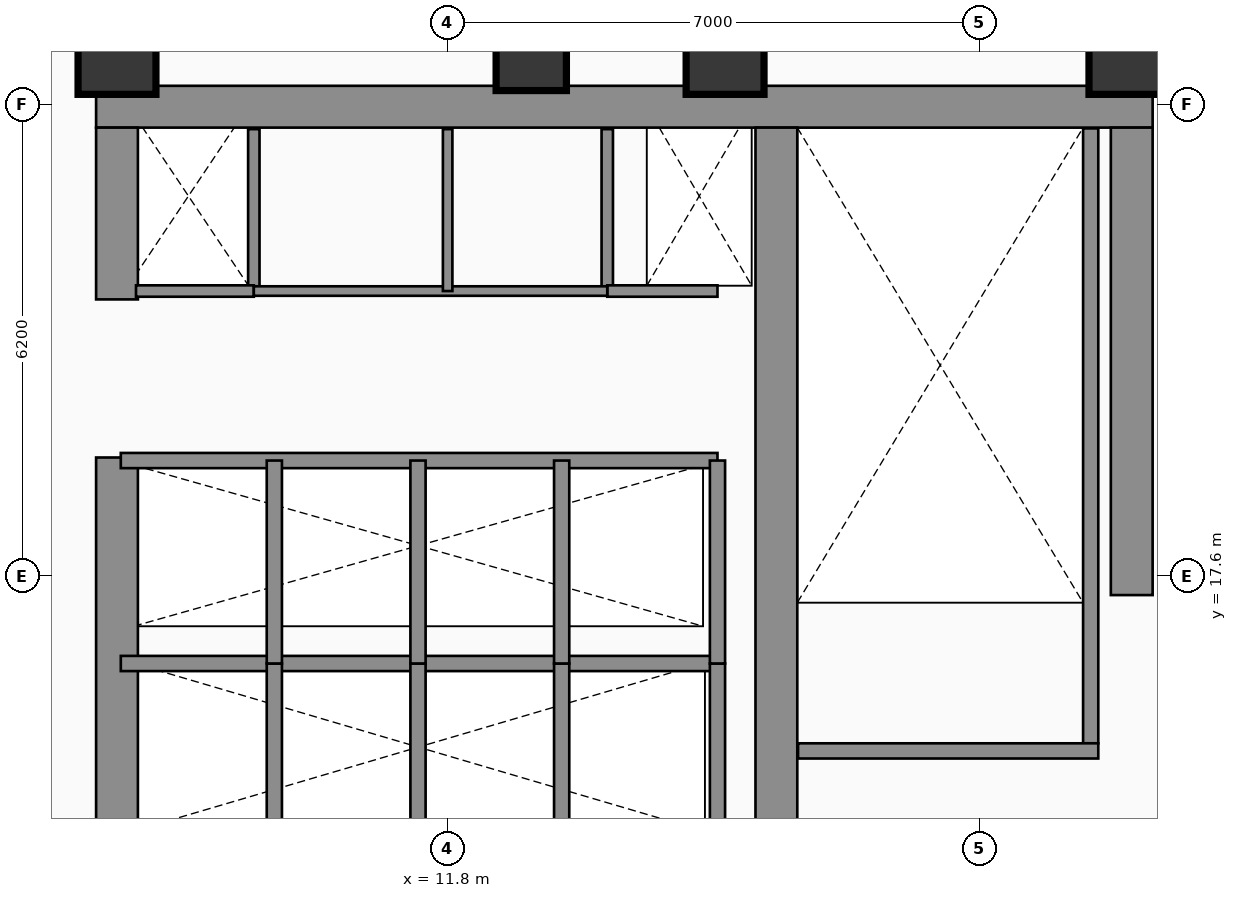
"""IFC4 building model, lengths in metres.
Left out: names, types, materials, properties, quantities, classifications, styles, units other than length and angle.
Written with IfcOpenShell. Run it as: python <this file> out.ifc"""

import sys

from ifc_helpers import new_model, si_unit, direction, frame, frame_2d, origin, origin_2d, place, context, subcontext, project, spatial, rectangle, extrude, element, fill, save


model = new_model("IFC4")
c1 = context("Model", 3, precision=1e-05, world=origin(), true_north=direction((0.0, 1.0)))
c2 = subcontext(c1, "Body", "Model", "MODEL_VIEW")
j1 = project(units=[si_unit("LENGTHUNIT", "METRE"), si_unit("PLANEANGLEUNIT", "RADIAN")], contexts=[c1])
p1 = place(None, origin())
s1 = spatial("IfcSite", under=j1, at=p1, CompositionType="ELEMENT")
p2 = place(p1, origin())
s2 = spatial("IfcBuilding", under=s1, at=p2, CompositionType="ELEMENT")
p3 = place(p2, frame((0.0, 0.0, 223.5)))
s3 = spatial("IfcBuildingStorey", under=s2, at=p3, CompositionType="ELEMENT", Elevation=223.5)
p4 = place(p3, frame((7.175, 23.775, 0.0), z_axis=(0.0, 0.0, 1.0), x_axis=(1.0, 0.0, 0.0)))
e1 = element("IfcWall", 1, at=p4, inside=s3, PredefinedType="SHEAR", context=c2, shape_type="SweptSolid", body=[
    extrude(rectangle(XDim=13.9, YDim=0.55, at=frame_2d((6.95, 0.0))), origin(), (0.0, 0.0, 1.0), 3.56),
])
p5 = place(p3, frame((7.45, 14.35, 0.0), z_axis=(0.0, 0.0, 1.0), x_axis=(0.0, 1.0, 0.0)))
e2 = element("IfcWall", 2, at=p5, inside=s3, PredefinedType="SHEAR", context=c2, shape_type="SweptSolid", body=[
    extrude(rectangle(XDim=4.81, YDim=0.55, at=frame_2d((2.405, 0.0))), origin(), (0.0, 0.0, 1.0), 3.56),
])
p6 = place(p3, frame((7.45, 21.24, 0.0), z_axis=(0.0, 0.0, 1.0), x_axis=(0.0, 1.0, 0.0)))
e3 = element("IfcWall", 3, at=p6, inside=s3, PredefinedType="SHEAR", context=c2, shape_type="SweptSolid", body=[
    extrude(rectangle(XDim=2.26, YDim=0.55, at=frame_2d((1.13, 0.0))), origin(), (0.0, 0.0, 1.0), 3.56),
])
p7 = place(p3, frame((20.8, 17.35, 0.0), z_axis=(0.0, 0.0, 1.0), x_axis=(0.0, 1.0, 0.0)))
e4 = element("IfcWall", 4, at=p7, inside=s3, PredefinedType="SHEAR", context=c2, shape_type="SweptSolid", body=[
    extrude(rectangle(XDim=6.15, YDim=0.55, at=frame_2d((3.075, 0.0))), origin(), (0.0, 0.0, 1.0), 3.56),
])
p8 = place(p3, frame((16.125, 14.4, 0.0), z_axis=(0.0, 0.0, 1.0), x_axis=(0.0, 1.0, 0.0)))
e5 = element("IfcWall", 5, at=p8, inside=s3, PredefinedType="SHEAR", context=c2, shape_type="SweptSolid", body=[
    extrude(rectangle(XDim=9.1, YDim=0.55, at=frame_2d((4.55, 0.0))), origin(), (0.0, 0.0, 1.0), 3.56),
])
for number, where, z_axis, x_axis in (
    (6, (7.45, 24.45, 0.0), (0.0, 0.0, 1.0), (1.0, 0.0, 0.0)),
    (7, (15.45, 24.45, 0.0), (0.0, 0.0, 1.0), (1.0, 0.0, 0.0)),
    (8, (20.75, 24.45, 0.0), (0.0, 0.0, 1.0), (1.0, 0.0, 0.0)),
):
    element("IfcColumn", number, at=place(p3, frame(where, z_axis=z_axis, x_axis=x_axis)), inside=s3, PredefinedType="COLUMN", context=c2, shape_type="SweptSolid", body=[
        extrude(rectangle(XDim=1.0, YDim=1.0, at=origin_2d()), origin(), (0.0, 0.0, 1.0), 3.56),
    ])
p9 = place(p3, frame((12.9, 24.45, 0.0), z_axis=(0.0, 0.0, 1.0), x_axis=(1.0, 0.0, 0.0)))
e9 = element("IfcColumn", 9, at=p9, inside=s3, PredefinedType="COLUMN", context=c2, shape_type="SweptSolid", body=[
    extrude(rectangle(XDim=0.9, YDim=0.9, at=origin_2d()), origin(), (0.0, 0.0, 1.0), 3.56),
])
p10 = place(p3, frame((27.685, 19.775, 0.0), z_axis=(0.0, 0.0, 1.0), x_axis=(-0.707106781187, 0.707106781187, 0.0)))
e10 = element("IfcWall", 10, at=p10, inside=s3, PredefinedType="SOLIDWALL", context=c2, shape_type="SweptSolid", body=[
    extrude(rectangle(XDim=9.207, YDim=0.28, at=frame_2d((4.603, 0.0))), origin(), (0.0, 0.0, 1.0), 3.56),
])
p11 = place(p3, frame((20.26, 15.4, 0.0), z_axis=(0.0, 0.0, 1.0), x_axis=(0.0, 1.0, 0.0)))
e11 = element("IfcWall", 11, at=p11, inside=s3, PredefinedType="SHEAR", context=c2, shape_type="SweptSolid", body=[
    extrude(rectangle(XDim=8.09, YDim=0.2, at=frame_2d((4.045, 0.0))), origin(), (0.0, 0.0, 1.0), 3.56),
])
p12 = place(p3, frame((16.41, 15.3, 0.0), z_axis=(0.0, 0.0, 1.0), x_axis=(1.0, 0.0, 0.0)))
e12 = element("IfcWall", 12, at=p12, inside=s3, PredefinedType="PARTITIONING", context=c2, shape_type="SweptSolid", body=[
    extrude(rectangle(XDim=3.95, YDim=0.2, at=frame_2d((1.975, 0.0))), origin(), (0.0, 0.0, 1.0), 3.56),
])
p13 = place(p12, frame((1.294, 0.0, 0.0)))
e13 = element("IfcOpeningElement", 13, at=p13, cuts=e12, PredefinedType="OPENING", context=c2, shape_type="SweptSolid", body=[
    extrude(rectangle(XDim=1.1, YDim=2.2, at=frame_2d((0.55, 1.1))), frame((0.0, 0.11, 0.0), z_axis=(0.0, -1.0, 0.0), x_axis=(1.0, 0.0, 0.0)), (0.0, 0.0, 1.0), 0.22),
])
p14 = place(p3, frame((7.5, 16.45, 0.0), z_axis=(0.0, 0.0, 1.0), x_axis=(1.0, 0.0, 0.0)))
e14 = element("IfcWall", 14, at=p14, inside=s3, PredefinedType="PARTITIONING", context=c2, shape_type="SweptSolid", body=[
    extrude(rectangle(XDim=7.85, YDim=0.2, at=frame_2d((3.925, 0.0))), origin(), (0.0, 0.0, 1.0), 3.56),
])
for number, where, z_axis, x_axis in (
    (15, (15.35, 14.22, 0.0), (0.0, 0.0, 1.0), (0.0, 1.0, 0.0)),
    (16, (9.52, 14.22, 0.0), (0.0, 0.0, 1.0), (0.0, 1.0, 0.0)),
    (17, (11.41, 14.22, 0.0), (0.0, 0.0, 1.0), (0.0, 1.0, 0.0)),
    (18, (13.3, 14.22, 0.0), (0.0, 0.0, 1.0), (0.0, 1.0, 0.0)),
):
    element("IfcWall", number, at=place(p3, frame(where, z_axis=z_axis, x_axis=x_axis)), inside=s3, PredefinedType="PARTITIONING", context=c2, shape_type="SweptSolid", body=[
        extrude(rectangle(XDim=2.23, YDim=0.2, at=frame_2d((1.115, 0.0))), origin(), (0.0, 0.0, 1.0), 3.56),
    ])
p15 = place(p3, frame((7.5, 19.12, 0.0), z_axis=(0.0, 0.0, 1.0), x_axis=(1.0, 0.0, 0.0)))
e19 = element("IfcWall", 19, at=p15, inside=s3, PredefinedType="PARTITIONING", context=c2, shape_type="SweptSolid", body=[
    extrude(rectangle(XDim=7.85, YDim=0.2, at=frame_2d((3.925, 0.0))), origin(), (0.0, 0.0, 1.0), 3.56),
])
p16 = place(p15, frame((0.53, 0.0, 0.0)))
e20 = element("IfcOpeningElement", 20, at=p16, cuts=e19, PredefinedType="OPENING", context=c2, shape_type="SweptSolid", body=[
    extrude(rectangle(XDim=1.1, YDim=2.2, at=frame_2d((0.55, 1.1))), frame((0.0, 0.11, 0.0), z_axis=(0.0, -1.0, 0.0), x_axis=(1.0, 0.0, 0.0)), (0.0, 0.0, 1.0), 0.22),
])
p17 = place(p15, frame((2.42, 0.0, 0.0)))
e21 = element("IfcOpeningElement", 21, at=p17, cuts=e19, PredefinedType="OPENING", context=c2, shape_type="SweptSolid", body=[
    extrude(rectangle(XDim=1.1, YDim=2.2, at=frame_2d((0.55, 1.1))), frame((0.0, 0.11, 0.0), z_axis=(0.0, -1.0, 0.0), x_axis=(1.0, 0.0, 0.0)), (0.0, 0.0, 1.0), 0.22),
])
p18 = place(p15, frame((4.31, 0.0, 0.0)))
e22 = element("IfcOpeningElement", 22, at=p18, cuts=e19, PredefinedType="OPENING", context=c2, shape_type="SweptSolid", body=[
    extrude(rectangle(XDim=1.1, YDim=2.2, at=frame_2d((0.55, 1.1))), frame((0.0, 0.11, 0.0), z_axis=(0.0, -1.0, 0.0), x_axis=(1.0, 0.0, 0.0)), (0.0, 0.0, 1.0), 0.22),
])
p19 = place(p15, frame((6.2, 0.0, 0.0)))
e23 = element("IfcOpeningElement", 23, at=p19, cuts=e19, PredefinedType="OPENING", context=c2, shape_type="SweptSolid", body=[
    extrude(rectangle(XDim=1.1, YDim=2.2, at=frame_2d((0.55, 1.1))), frame((0.0, 0.11, 0.0), z_axis=(0.0, -1.0, 0.0), x_axis=(1.0, 0.0, 0.0)), (0.0, 0.0, 1.0), 0.22),
])
for number, where, z_axis, x_axis in (
    (24, (15.35, 16.45, 0.0), (0.0, 0.0, 1.0), (0.0, 1.0, 0.0)),
    (25, (9.52, 16.45, 0.0), (0.0, 0.0, 1.0), (0.0, 1.0, 0.0)),
    (26, (11.41, 16.45, 0.0), (0.0, 0.0, 1.0), (0.0, 1.0, 0.0)),
    (27, (13.3, 16.45, 0.0), (0.0, 0.0, 1.0), (0.0, 1.0, 0.0)),
):
    element("IfcWall", number, at=place(p3, frame(where, z_axis=z_axis, x_axis=x_axis)), inside=s3, PredefinedType="PARTITIONING", context=c2, shape_type="SweptSolid", body=[
        extrude(rectangle(XDim=2.67, YDim=0.2, at=frame_2d((1.335, 0.0))), origin(), (0.0, 0.0, 1.0), 3.56),
    ])
for number, where, z_axis, x_axis in (
    (28, (9.25, 21.35, 0.0), (0.0, 0.0, 1.0), (0.0, 1.0, 0.0)),
    (29, (13.9, 21.35, 0.0), (0.0, 0.0, 1.0), (0.0, 1.0, 0.0)),
):
    element("IfcWall", number, at=place(p3, frame(where, z_axis=z_axis, x_axis=x_axis)), inside=s3, PredefinedType="PARTITIONING", context=c2, shape_type="SweptSolid", body=[
        extrude(rectangle(XDim=2.13, YDim=0.15, at=frame_2d((1.065, 0.0))), origin(), (0.0, 0.0, 1.0), 3.56),
    ])
p20 = place(p3, frame((7.7, 21.35, 0.0), z_axis=(0.0, 0.0, 1.0), x_axis=(1.0, 0.0, 0.0)))
e30 = element("IfcWall", 30, at=p20, inside=s3, PredefinedType="PARTITIONING", context=c2, shape_type="SweptSolid", body=[
    extrude(rectangle(XDim=1.55, YDim=0.15, at=frame_2d((0.775, 0.0))), origin(), (0.0, 0.0, 1.0), 3.56),
])
p21 = place(p20, frame((0.39, 0.0, 0.0)))
e31 = element("IfcOpeningElement", 31, at=p21, cuts=e30, PredefinedType="OPENING", context=c2, shape_type="SweptSolid", body=[
    extrude(rectangle(XDim=0.85, YDim=2.15, at=frame_2d((0.425, 1.075))), frame((0.0, 0.085, 0.0), z_axis=(0.0, -1.0, 0.0), x_axis=(1.0, 0.0, 0.0)), (0.0, 0.0, 1.0), 0.17),
])
p22 = place(p3, frame((13.9, 21.35, 0.0), z_axis=(0.0, 0.0, 1.0), x_axis=(1.0, 0.0, 0.0)))
e32 = element("IfcWall", 32, at=p22, inside=s3, PredefinedType="PARTITIONING", context=c2, shape_type="SweptSolid", body=[
    extrude(rectangle(XDim=1.45, YDim=0.15, at=frame_2d((0.725, 0.0))), origin(), (0.0, 0.0, 1.0), 3.56),
])
p23 = place(p3, frame((9.25, 21.35, 0.0), z_axis=(0.0, 0.0, 1.0), x_axis=(1.0, 0.0, 0.0)))
e33 = element("IfcWall", 33, at=p23, inside=s3, PredefinedType="PARTITIONING", context=c2, shape_type="SweptSolid", body=[
    extrude(rectangle(XDim=4.65, YDim=0.125, at=frame_2d((2.325, 0.0))), origin(), (0.0, 0.0, 1.0), 3.56),
])
p24 = place(p23, frame((0.85, 0.0, 0.0)))
e34 = element("IfcOpeningElement", 34, at=p24, cuts=e33, PredefinedType="OPENING", context=c2, shape_type="SweptSolid", body=[
    extrude(rectangle(XDim=0.85, YDim=2.15, at=frame_2d((0.425, 1.075))), frame((0.0, 0.073, 0.0), z_axis=(0.0, -1.0, 0.0), x_axis=(1.0, 0.0, 0.0)), (0.0, 0.0, 1.0), 0.145),
])
p25 = place(p23, frame((3.25, 0.0, 0.0)))
e35 = element("IfcOpeningElement", 35, at=p25, cuts=e33, PredefinedType="OPENING", context=c2, shape_type="SweptSolid", body=[
    extrude(rectangle(XDim=0.85, YDim=2.15, at=frame_2d((0.425, 1.075))), frame((0.0, 0.073, 0.0), z_axis=(0.0, -1.0, 0.0), x_axis=(1.0, 0.0, 0.0)), (0.0, 0.0, 1.0), 0.145),
])
p26 = place(p3, frame((11.8, 21.35, 0.0), z_axis=(0.0, 0.0, 1.0), x_axis=(0.0, 1.0, 0.0)))
e36 = element("IfcWall", 36, at=p26, inside=s3, PredefinedType="PARTITIONING", context=c2, shape_type="SweptSolid", body=[
    extrude(rectangle(XDim=2.13, YDim=0.125, at=frame_2d((1.065, 0.0))), origin(), (0.0, 0.0, 1.0), 3.56),
])
p27 = place(p13, origin())
e37 = element("IfcDoor", 37, at=p27, inside=s3, OperationType="SINGLE_SWING_LEFT", PredefinedType="DOOR", context=c2, shape_type="SweptSolid", body=[
    extrude(rectangle(XDim=1.1, YDim=2.2, at=frame_2d((0.55, 1.1))), frame((0.0, 0.025, 0.0), z_axis=(0.0, -1.0, 0.0), x_axis=(1.0, 0.0, 0.0)), (0.0, 0.0, 1.0), 0.05),
])
fill(e13, e37)
p28 = place(p16, origin())
e38 = element("IfcDoor", 38, at=p28, inside=s3, OperationType="SLIDING_TO_LEFT", PredefinedType="DOOR", context=c2, shape_type="SweptSolid", body=[
    extrude(rectangle(XDim=1.1, YDim=2.2, at=frame_2d((0.55, 1.1))), frame((0.0, 0.025, 0.0), z_axis=(0.0, -1.0, 0.0), x_axis=(1.0, 0.0, 0.0)), (0.0, 0.0, 1.0), 0.05),
])
fill(e20, e38)
p29 = place(p17, origin())
e39 = element("IfcDoor", 39, at=p29, inside=s3, OperationType="SLIDING_TO_LEFT", PredefinedType="DOOR", context=c2, shape_type="SweptSolid", body=[
    extrude(rectangle(XDim=1.1, YDim=2.2, at=frame_2d((0.55, 1.1))), frame((0.0, 0.025, 0.0), z_axis=(0.0, -1.0, 0.0), x_axis=(1.0, 0.0, 0.0)), (0.0, 0.0, 1.0), 0.05),
])
fill(e21, e39)
p30 = place(p18, origin())
e40 = element("IfcDoor", 40, at=p30, inside=s3, OperationType="SLIDING_TO_LEFT", PredefinedType="DOOR", context=c2, shape_type="SweptSolid", body=[
    extrude(rectangle(XDim=1.1, YDim=2.2, at=frame_2d((0.55, 1.1))), frame((0.0, 0.025, 0.0), z_axis=(0.0, -1.0, 0.0), x_axis=(1.0, 0.0, 0.0)), (0.0, 0.0, 1.0), 0.05),
])
fill(e22, e40)
p31 = place(p19, origin())
e41 = element("IfcDoor", 41, at=p31, inside=s3, OperationType="SLIDING_TO_LEFT", PredefinedType="DOOR", context=c2, shape_type="SweptSolid", body=[
    extrude(rectangle(XDim=1.1, YDim=2.2, at=frame_2d((0.55, 1.1))), frame((0.0, 0.025, 0.0), z_axis=(0.0, -1.0, 0.0), x_axis=(1.0, 0.0, 0.0)), (0.0, 0.0, 1.0), 0.05),
])
fill(e23, e41)
p32 = place(p21, origin())
e42 = element("IfcDoor", 42, at=p32, inside=s3, OperationType="SINGLE_SWING_LEFT", PredefinedType="DOOR", context=c2, shape_type="SweptSolid", body=[
    extrude(rectangle(XDim=0.85, YDim=2.15, at=frame_2d((0.425, 1.075))), frame((0.0, 0.025, 0.0), z_axis=(0.0, -1.0, 0.0), x_axis=(1.0, 0.0, 0.0)), (0.0, 0.0, 1.0), 0.05),
])
fill(e31, e42)
p33 = place(p24, origin())
e43 = element("IfcDoor", 43, at=p33, inside=s3, OperationType="SINGLE_SWING_RIGHT", PredefinedType="DOOR", context=c2, shape_type="SweptSolid", body=[
    extrude(rectangle(XDim=0.85, YDim=2.15, at=frame_2d((0.425, 1.075))), frame((0.0, 0.025, 0.0), z_axis=(0.0, -1.0, 0.0), x_axis=(1.0, 0.0, 0.0)), (0.0, 0.0, 1.0), 0.05),
])
fill(e34, e43)
p34 = place(p25, origin())
e44 = element("IfcDoor", 44, at=p34, inside=s3, OperationType="SINGLE_SWING_LEFT", PredefinedType="DOOR", context=c2, shape_type="SweptSolid", body=[
    extrude(rectangle(XDim=0.85, YDim=2.15, at=frame_2d((0.425, 1.075))), frame((0.0, 0.025, 0.0), z_axis=(0.0, -1.0, 0.0), x_axis=(1.0, 0.0, 0.0)), (0.0, 0.0, 1.0), 0.05),
])
fill(e35, e44)
save(model, sys.argv[1])
